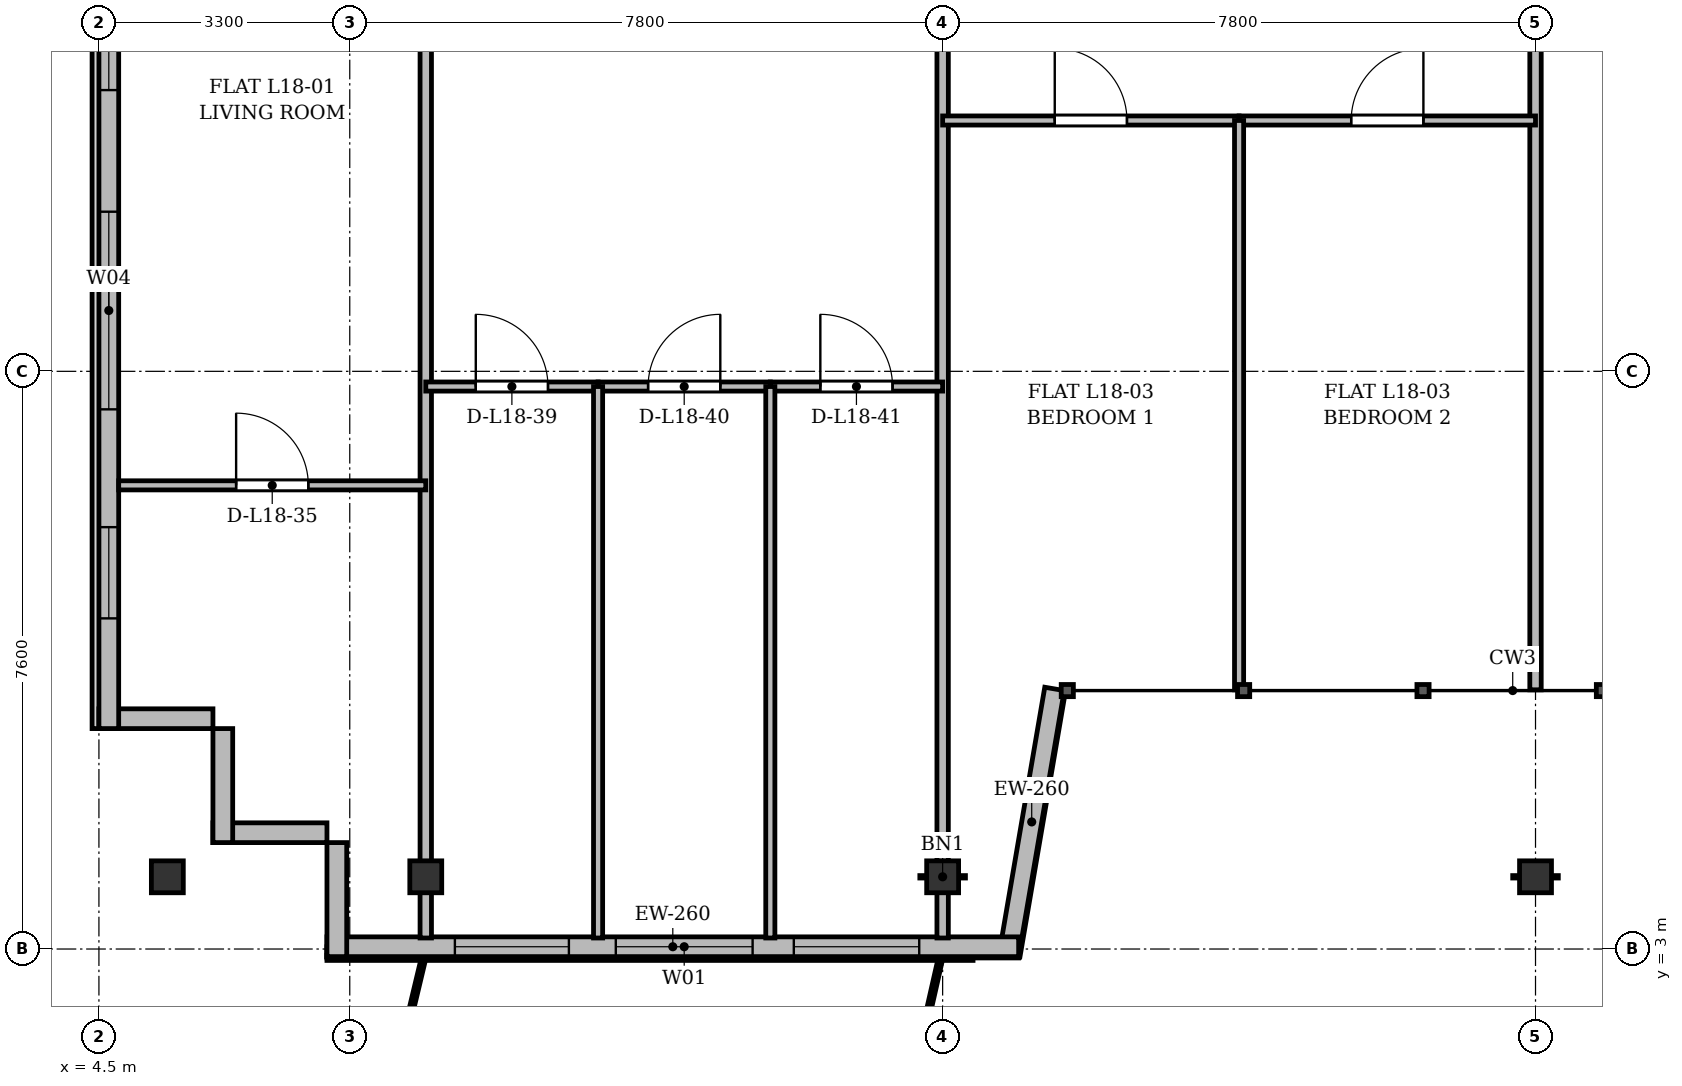
"""IFC4 building model, lengths in metres.
Left out: names, types, materials, properties, quantities, classifications, styles, units other than length and angle.
Written with IfcOpenShell. Run it as: python <this file> out.ifc"""

import sys

from ifc_helpers import new_model, si_unit, direction, frame, frame_2d, origin, origin_2d, place, context, subcontext, project, spatial, rectangle, i_section, extrude, source, transform, mapped, element, fill, save


model = new_model("IFC4")
c1 = context("Model", 3, precision=1e-05, world=origin(), true_north=direction((0.0, 1.0)))
c2 = subcontext(c1, "Body", "Model", "MODEL_VIEW")
j1 = project(units=[si_unit("LENGTHUNIT", "METRE"), si_unit("PLANEANGLEUNIT", "RADIAN")], contexts=[c1])
p1 = place(None, origin())
s1 = spatial("IfcSite", under=j1, at=p1, CompositionType="ELEMENT")
p2 = place(p1, origin())
s2 = spatial("IfcBuilding", under=s1, at=p2, CompositionType="ELEMENT")
p3 = place(p2, frame((0.0, 0.0, 70.3)))
s3 = spatial("IfcBuildingStorey", under=s2, at=p3, CompositionType="ELEMENT", Elevation=70.3)
m1 = source(origin(), c2, "Body", "SweptSolid", [
    extrude(i_section(OverallWidth=0.42, OverallDepth=0.42, WebThickness=0.026, FlangeThickness=0.04, at=origin_2d()), origin(), (0.0, 0.0, 1.0), 3.6),
])
for number, where, z_axis, x_axis in (
    (1, (5.4, 3.95, 0.0), (0.0, 0.0, 1.0), (1.0, 0.0, 0.0)),
    (2, (8.8, 3.95, 0.0), (0.0, 0.0, 1.0), (1.0, 0.0, 0.0)),
    (3, (15.6, 3.95, 0.0), (0.0, 0.0, 1.0), (1.0, 0.0, 0.0)),
    (4, (23.4, 3.95, 0.0), (0.0, 0.0, 1.0), (1.0, 0.0, 0.0)),
):
    element("IfcColumn", number, at=place(p3, frame(where, z_axis=z_axis, x_axis=x_axis)), inside=s3, PredefinedType="COLUMN", context=c2, shape_type="MappedRepresentation", body=[
        mapped(m1, transform((0.0, 0.0, 0.0), x_axis=(1.0, 0.0, 0.0), y_axis=(0.0, 1.0, 0.0), z_axis=(0.0, 0.0, 1.0), scale=1.0)),
    ])
for number, where, z_axis, x_axis in (
    (5, (7.5, 4.53, 0.0), (0.0, 0.0, 1.0), (-1.0, 0.0, 0.0)),
    (6, (6.13, 4.4, 0.0), (0.0, 0.0, 1.0), (0.0, 1.0, 0.0)),
):
    element("IfcWall", number, at=place(p3, frame(where, z_axis=z_axis, x_axis=x_axis)), inside=s3, PredefinedType="SOLIDWALL", context=c2, shape_type="SweptSolid", body=[
        extrude(rectangle(XDim=1.5, YDim=0.26, at=frame_2d((0.75, 0.0))), origin(), (0.0, 0.0, 1.0), 3.22),
    ])
p4 = place(p3, frame((6.0, 6.03, 0.0), z_axis=(0.0, 0.0, 1.0), x_axis=(-1.0, 0.0, 0.0)))
e7 = element("IfcWall", 7, at=p4, inside=s3, PredefinedType="SOLIDWALL", context=c2, shape_type="SweptSolid", body=[
    extrude(rectangle(XDim=1.5, YDim=0.26, at=frame_2d((0.75, 0.0))), origin(), (0.0, 0.0, 1.0), 2.632),
])
p5 = place(p3, frame((4.63, 5.9, 0.0), z_axis=(0.0, 0.0, 1.0), x_axis=(0.0, 1.0, 0.0)))
e8 = element("IfcWall", 8, at=p5, inside=s3, PredefinedType="SOLIDWALL", context=c2, shape_type="SweptSolid", body=[
    extrude(rectangle(XDim=39.6, YDim=0.26, at=frame_2d((19.8, 0.0))), origin(), (0.0, 0.0, 1.0), 3.22),
])
p6 = place(p5, frame((1.45, 0.0, 0.92)))
e9 = element("IfcOpeningElement", 9, at=p6, cuts=e8, PredefinedType="OPENING", context=c2, shape_type="SweptSolid", body=[
    extrude(rectangle(XDim=1.2, YDim=1.65, at=frame_2d((0.6, 0.825))), frame((0.0, 0.14, 0.0), z_axis=(0.0, -1.0, 0.0), x_axis=(1.0, 0.0, 0.0)), (0.0, 0.0, 1.0), 0.28),
])
p7 = place(p5, frame((4.2, 0.0, 0.92)))
e10 = element("IfcOpeningElement", 10, at=p7, cuts=e8, PredefinedType="OPENING", context=c2, shape_type="SweptSolid", body=[
    extrude(rectangle(XDim=2.6, YDim=1.9, at=frame_2d((1.3, 0.95))), frame((0.0, 0.14, 0.0), z_axis=(0.0, -1.0, 0.0), x_axis=(1.0, 0.0, 0.0)), (0.0, 0.0, 1.0), 0.28),
])
p8 = place(p5, frame((8.4, 0.0, 0.92)))
e11 = element("IfcOpeningElement", 11, at=p8, cuts=e8, PredefinedType="OPENING", context=c2, shape_type="SweptSolid", body=[
    extrude(rectangle(XDim=2.6, YDim=1.9, at=frame_2d((1.3, 0.95))), frame((0.0, 0.14, 0.0), z_axis=(0.0, -1.0, 0.0), x_axis=(1.0, 0.0, 0.0)), (0.0, 0.0, 1.0), 0.28),
])
p9 = place(p5, frame((33.9, 0.0, 0.92)))
e12 = element("IfcOpeningElement", 12, at=p9, cuts=e8, PredefinedType="OPENING", context=c2, shape_type="SweptSolid", body=[
    extrude(rectangle(XDim=1.2, YDim=1.65, at=frame_2d((0.6, 0.825))), frame((0.0, 0.14, 0.0), z_axis=(0.0, -1.0, 0.0), x_axis=(1.0, 0.0, 0.0)), (0.0, 0.0, 1.0), 0.28),
])
p10 = place(p5, frame((37.25, 0.0, 0.92)))
e13 = element("IfcOpeningElement", 13, at=p10, cuts=e8, PredefinedType="OPENING", context=c2, shape_type="SweptSolid", body=[
    extrude(rectangle(XDim=1.2, YDim=1.65, at=frame_2d((0.6, 0.825))), frame((0.0, 0.14, 0.0), z_axis=(0.0, -1.0, 0.0), x_axis=(1.0, 0.0, 0.0)), (0.0, 0.0, 1.0), 0.28),
])
p11 = place(p3, frame((17.072, 6.422, 0.0), z_axis=(0.0, 0.0, 1.0), x_axis=(-0.168990530437, -0.98561767467, 0.0)))
e14 = element("IfcWall", 14, at=p11, inside=s3, PredefinedType="SOLIDWALL", context=c2, shape_type="SweptSolid", body=[
    extrude(rectangle(XDim=3.551, YDim=0.26, at=frame_2d((1.775, 0.0))), origin(), (0.0, 0.0, 1.0), 2.57),
])
p12 = place(p3, frame((16.6, 3.03, 0.0), z_axis=(0.0, 0.0, 1.0), x_axis=(-1.0, 0.0, 0.0)))
e15 = element("IfcWall", 15, at=p12, inside=s3, PredefinedType="SOLIDWALL", context=c2, shape_type="SweptSolid", body=[
    extrude(rectangle(XDim=9.1, YDim=0.26, at=frame_2d((4.55, 0.0))), origin(), (0.0, 0.0, 1.0), 3.22),
])
p13 = place(p12, frame((1.308, 0.0, 0.9)))
e16 = element("IfcOpeningElement", 16, at=p13, cuts=e15, PredefinedType="OPENING", context=c2, shape_type="SweptSolid", body=[
    extrude(rectangle(XDim=1.65, YDim=1.85, at=frame_2d((0.825, 0.925))), frame((0.0, 0.14, 0.0), z_axis=(0.0, -1.0, 0.0), x_axis=(1.0, 0.0, 0.0)), (0.0, 0.0, 1.0), 0.28),
])
p14 = place(p12, frame((3.5, 0.0, 0.9)))
e17 = element("IfcOpeningElement", 17, at=p14, cuts=e15, PredefinedType="OPENING", context=c2, shape_type="SweptSolid", body=[
    extrude(rectangle(XDim=1.8, YDim=1.8, at=frame_2d((0.9, 0.9))), frame((0.0, 0.14, 0.0), z_axis=(0.0, -1.0, 0.0), x_axis=(1.0, 0.0, 0.0)), (0.0, 0.0, 1.0), 0.28),
])
p15 = place(p12, frame((5.917, 0.0, 0.9)))
e18 = element("IfcOpeningElement", 18, at=p15, cuts=e15, PredefinedType="OPENING", context=c2, shape_type="SweptSolid", body=[
    extrude(rectangle(XDim=1.5, YDim=1.75, at=frame_2d((0.75, 0.875))), frame((0.0, 0.14, 0.0), z_axis=(0.0, -1.0, 0.0), x_axis=(1.0, 0.0, 0.0)), (0.0, 0.0, 1.0), 0.28),
])
p16 = place(p3, frame((7.63, 2.9, 0.0), z_axis=(0.0, 0.0, 1.0), x_axis=(0.0, 1.0, 0.0)))
e19 = element("IfcWall", 19, at=p16, inside=s3, PredefinedType="SOLIDWALL", context=c2, shape_type="SweptSolid", body=[
    extrude(rectangle(XDim=1.5, YDim=0.26, at=frame_2d((0.75, 0.0))), origin(), (0.0, 0.0, 1.0), 2.57),
])
for number, where, z_axis, x_axis in (
    (20, (8.8, 3.145, 0.0), (0.0, 0.0, 1.0), (0.0, 1.0, 0.0)),
    (21, (15.6, 3.145, 0.0), (0.0, 0.0, 1.0), (0.0, 1.0, 0.0)),
):
    element("IfcWall", number, at=place(p3, frame(where, z_axis=z_axis, x_axis=x_axis)), inside=s3, PredefinedType="PARTITIONING", context=c2, shape_type="SweptSolid", body=[
        extrude(rectangle(XDim=24.455, YDim=0.15, at=frame_2d((12.228, 0.0))), origin(), (0.0, 0.0, 1.0), 2.632),
    ])
p17 = place(p3, frame((23.4, 6.41, 0.0), z_axis=(0.0, 0.0, 1.0), x_axis=(0.0, 1.0, 0.0)))
e22 = element("IfcWall", 22, at=p17, inside=s3, PredefinedType="PARTITIONING", context=c2, shape_type="SweptSolid", body=[
    extrude(rectangle(XDim=21.19, YDim=0.15, at=frame_2d((10.595, 0.0))), origin(), (0.0, 0.0, 1.0), 2.632),
])
p18 = place(p3, frame((4.76, 9.1, 0.0), z_axis=(0.0, 0.0, 1.0), x_axis=(1.0, 0.0, 0.0)))
e23 = element("IfcWall", 23, at=p18, inside=s3, PredefinedType="PARTITIONING", context=c2, shape_type="SweptSolid", body=[
    extrude(rectangle(XDim=4.04, YDim=0.12, at=frame_2d((2.02, 0.0))), origin(), (0.0, 0.0, 1.0), 2.632),
])
p19 = place(p18, frame((1.545, 0.0, 0.0)))
e24 = element("IfcOpeningElement", 24, at=p19, cuts=e23, PredefinedType="OPENING", context=c2, shape_type="SweptSolid", body=[
    extrude(rectangle(XDim=0.95, YDim=2.15, at=frame_2d((0.475, 1.075))), frame((0.0, 0.07, 0.0), z_axis=(0.0, -1.0, 0.0), x_axis=(1.0, 0.0, 0.0)), (0.0, 0.0, 1.0), 0.14),
])
p20 = place(p3, frame((8.8, 10.4, 0.0), z_axis=(0.0, 0.0, 1.0), x_axis=(1.0, 0.0, 0.0)))
e25 = element("IfcWall", 25, at=p20, inside=s3, PredefinedType="PARTITIONING", context=c2, shape_type="SweptSolid", body=[
    extrude(rectangle(XDim=2.267, YDim=0.12, at=frame_2d((1.133, 0.0))), origin(), (0.0, 0.0, 1.0), 2.632),
])
p21 = place(p20, frame((0.658, 0.0, 0.0)))
e26 = element("IfcOpeningElement", 26, at=p21, cuts=e25, PredefinedType="OPENING", context=c2, shape_type="SweptSolid", body=[
    extrude(rectangle(XDim=0.95, YDim=2.15, at=frame_2d((0.475, 1.075))), frame((0.0, 0.07, 0.0), z_axis=(0.0, -1.0, 0.0), x_axis=(1.0, 0.0, 0.0)), (0.0, 0.0, 1.0), 0.14),
])
p22 = place(p3, frame((11.067, 10.4, 0.0), z_axis=(0.0, 0.0, 1.0), x_axis=(1.0, 0.0, 0.0)))
e27 = element("IfcWall", 27, at=p22, inside=s3, PredefinedType="PARTITIONING", context=c2, shape_type="SweptSolid", body=[
    extrude(rectangle(XDim=2.266, YDim=0.12, at=frame_2d((1.133, 0.0))), origin(), (0.0, 0.0, 1.0), 3.22),
])
p23 = place(p22, frame((0.658, 0.0, 0.0)))
e28 = element("IfcOpeningElement", 28, at=p23, cuts=e27, PredefinedType="OPENING", context=c2, shape_type="SweptSolid", body=[
    extrude(rectangle(XDim=0.95, YDim=2.15, at=frame_2d((0.475, 1.075))), frame((0.0, 0.07, 0.0), z_axis=(0.0, -1.0, 0.0), x_axis=(1.0, 0.0, 0.0)), (0.0, 0.0, 1.0), 0.14),
])
p24 = place(p3, frame((11.067, 3.145, 0.0), z_axis=(0.0, 0.0, 1.0), x_axis=(0.0, 1.0, 0.0)))
e29 = element("IfcWall", 29, at=p24, inside=s3, PredefinedType="PARTITIONING", context=c2, shape_type="SweptSolid", body=[
    extrude(rectangle(XDim=7.255, YDim=0.12, at=frame_2d((3.627, 0.0))), origin(), (0.0, 0.0, 1.0), 2.57),
])
p25 = place(p3, frame((13.333, 10.4, 0.0), z_axis=(0.0, 0.0, 1.0), x_axis=(1.0, 0.0, 0.0)))
e30 = element("IfcWall", 30, at=p25, inside=s3, PredefinedType="PARTITIONING", context=c2, shape_type="SweptSolid", body=[
    extrude(rectangle(XDim=2.267, YDim=0.12, at=frame_2d((1.134, 0.0))), origin(), (0.0, 0.0, 1.0), 2.632),
])
p26 = place(p25, frame((0.658, 0.0, 0.0)))
e31 = element("IfcOpeningElement", 31, at=p26, cuts=e30, PredefinedType="OPENING", context=c2, shape_type="SweptSolid", body=[
    extrude(rectangle(XDim=0.95, YDim=2.15, at=frame_2d((0.475, 1.075))), frame((0.0, 0.07, 0.0), z_axis=(0.0, -1.0, 0.0), x_axis=(1.0, 0.0, 0.0)), (0.0, 0.0, 1.0), 0.14),
])
p27 = place(p3, frame((13.333, 3.145, 0.0), z_axis=(0.0, 0.0, 1.0), x_axis=(0.0, 1.0, 0.0)))
e32 = element("IfcWall", 32, at=p27, inside=s3, PredefinedType="PARTITIONING", context=c2, shape_type="SweptSolid", body=[
    extrude(rectangle(XDim=7.255, YDim=0.12, at=frame_2d((3.627, 0.0))), origin(), (0.0, 0.0, 1.0), 2.57),
])
p28 = place(p3, frame((15.6, 13.9, 0.0), z_axis=(0.0, 0.0, 1.0), x_axis=(1.0, 0.0, 0.0)))
e33 = element("IfcWall", 33, at=p28, inside=s3, PredefinedType="PARTITIONING", context=c2, shape_type="SweptSolid", body=[
    extrude(rectangle(XDim=3.9, YDim=0.12, at=frame_2d((1.95, 0.0))), origin(), (0.0, 0.0, 1.0), 2.632),
])
p29 = place(p28, frame((1.475, 0.0, 0.0)))
e34 = element("IfcOpeningElement", 34, at=p29, cuts=e33, PredefinedType="OPENING", context=c2, shape_type="SweptSolid", body=[
    extrude(rectangle(XDim=0.95, YDim=2.15, at=frame_2d((0.475, 1.075))), frame((0.0, 0.07, 0.0), z_axis=(0.0, -1.0, 0.0), x_axis=(1.0, 0.0, 0.0)), (0.0, 0.0, 1.0), 0.14),
])
p30 = place(p3, frame((19.5, 13.9, 0.0), z_axis=(0.0, 0.0, 1.0), x_axis=(1.0, 0.0, 0.0)))
e35 = element("IfcWall", 35, at=p30, inside=s3, PredefinedType="PARTITIONING", context=c2, shape_type="SweptSolid", body=[
    extrude(rectangle(XDim=3.9, YDim=0.12, at=frame_2d((1.95, 0.0))), origin(), (0.0, 0.0, 1.0), 2.632),
])
p31 = place(p30, frame((1.475, 0.0, 0.0)))
e36 = element("IfcOpeningElement", 36, at=p31, cuts=e35, PredefinedType="OPENING", context=c2, shape_type="SweptSolid", body=[
    extrude(rectangle(XDim=0.95, YDim=2.15, at=frame_2d((0.475, 1.075))), frame((0.0, 0.07, 0.0), z_axis=(0.0, -1.0, 0.0), x_axis=(1.0, 0.0, 0.0)), (0.0, 0.0, 1.0), 0.14),
])
p32 = place(p3, frame((19.5, 6.41, 0.0), z_axis=(0.0, 0.0, 1.0), x_axis=(0.0, 1.0, 0.0)))
e37 = element("IfcWall", 37, at=p32, inside=s3, PredefinedType="PARTITIONING", context=c2, shape_type="SweptSolid", body=[
    extrude(rectangle(XDim=7.49, YDim=0.12, at=frame_2d((3.745, 0.0))), origin(), (0.0, 0.0, 1.0), 3.22),
])
m2 = source(origin(), c2, "Body", "SweptSolid", [
    extrude(rectangle(XDim=1.2, YDim=1.65, at=frame_2d((0.6, 0.825))), frame((0.0, 0.03, 0.0), z_axis=(0.0, -1.0, 0.0), x_axis=(1.0, 0.0, 0.0)), (0.0, 0.0, 1.0), 0.06),
])
p33 = place(p6, origin())
e38 = element("IfcWindow", 38, at=p33, inside=s3, PartitioningType="SINGLE_PANEL", PredefinedType="WINDOW", context=c2, shape_type="MappedRepresentation", body=[
    mapped(m2, transform((0.0, 0.0, 0.0), x_axis=(1.0, 0.0, 0.0), y_axis=(0.0, 1.0, 0.0), z_axis=(0.0, 0.0, 1.0), scale=1.0)),
])
fill(e9, e38)
m3 = source(origin(), c2, "Body", "SweptSolid", [
    extrude(rectangle(XDim=2.6, YDim=1.9, at=frame_2d((1.3, 0.95))), frame((0.0, 0.03, 0.0), z_axis=(0.0, -1.0, 0.0), x_axis=(1.0, 0.0, 0.0)), (0.0, 0.0, 1.0), 0.06),
])
p34 = place(p7, origin())
e39 = element("IfcWindow", 39, at=p34, inside=s3, PartitioningType="SINGLE_PANEL", PredefinedType="WINDOW", context=c2, shape_type="MappedRepresentation", body=[
    mapped(m3, transform((0.0, 0.0, 0.0), x_axis=(1.0, 0.0, 0.0), y_axis=(0.0, 1.0, 0.0), z_axis=(0.0, 0.0, 1.0), scale=1.0)),
])
fill(e10, e39)
p35 = place(p8, origin())
e40 = element("IfcWindow", 40, at=p35, inside=s3, PartitioningType="SINGLE_PANEL", PredefinedType="WINDOW", context=c2, shape_type="MappedRepresentation", body=[
    mapped(m3, transform((0.0, 0.0, 0.0), x_axis=(1.0, 0.0, 0.0), y_axis=(0.0, 1.0, 0.0), z_axis=(0.0, 0.0, 1.0), scale=1.0)),
])
fill(e11, e40)
m4 = source(origin(), c2, "Body", "SweptSolid", [
    extrude(rectangle(XDim=1.65, YDim=1.85, at=frame_2d((0.825, 0.925))), frame((0.0, 0.03, 0.0), z_axis=(0.0, -1.0, 0.0), x_axis=(1.0, 0.0, 0.0)), (0.0, 0.0, 1.0), 0.06),
])
p36 = place(p13, origin())
e41 = element("IfcWindow", 41, at=p36, inside=s3, PartitioningType="SINGLE_PANEL", PredefinedType="WINDOW", context=c2, shape_type="MappedRepresentation", body=[
    mapped(m4, transform((0.0, 0.0, 0.0), x_axis=(1.0, 0.0, 0.0), y_axis=(0.0, 1.0, 0.0), z_axis=(0.0, 0.0, 1.0), scale=1.0)),
])
fill(e16, e41)
m5 = source(origin(), c2, "Body", "SweptSolid", [
    extrude(rectangle(XDim=1.8, YDim=1.8, at=frame_2d((0.9, 0.9))), frame((0.0, 0.03, 0.0), z_axis=(0.0, -1.0, 0.0), x_axis=(1.0, 0.0, 0.0)), (0.0, 0.0, 1.0), 0.06),
])
p37 = place(p14, origin())
e42 = element("IfcWindow", 42, at=p37, inside=s3, PartitioningType="SINGLE_PANEL", PredefinedType="WINDOW", context=c2, shape_type="MappedRepresentation", body=[
    mapped(m5, transform((0.0, 0.0, 0.0), x_axis=(1.0, 0.0, 0.0), y_axis=(0.0, 1.0, 0.0), z_axis=(0.0, 0.0, 1.0), scale=1.0)),
])
fill(e17, e42)
m6 = source(origin(), c2, "Body", "SweptSolid", [
    extrude(rectangle(XDim=1.5, YDim=1.75, at=frame_2d((0.75, 0.875))), frame((0.0, 0.03, 0.0), z_axis=(0.0, -1.0, 0.0), x_axis=(1.0, 0.0, 0.0)), (0.0, 0.0, 1.0), 0.06),
])
p38 = place(p15, origin())
e43 = element("IfcWindow", 43, at=p38, inside=s3, PartitioningType="SINGLE_PANEL", PredefinedType="WINDOW", context=c2, shape_type="MappedRepresentation", body=[
    mapped(m6, transform((0.0, 0.0, 0.0), x_axis=(1.0, 0.0, 0.0), y_axis=(0.0, 1.0, 0.0), z_axis=(0.0, 0.0, 1.0), scale=1.0)),
])
fill(e18, e43)
m7 = source(origin(), c2, "Body", "SweptSolid", [
    extrude(rectangle(XDim=0.95, YDim=2.15, at=frame_2d((0.475, 1.075))), frame((0.0, 0.025, 0.0), z_axis=(0.0, -1.0, 0.0), x_axis=(1.0, 0.0, 0.0)), (0.0, 0.0, 1.0), 0.05),
])
p39 = place(p19, origin())
e44 = element("IfcDoor", 44, at=p39, inside=s3, OperationType="SINGLE_SWING_LEFT", PredefinedType="DOOR", context=c2, shape_type="MappedRepresentation", body=[
    mapped(m7, transform((0.0, 0.0, 0.0), x_axis=(1.0, 0.0, 0.0), y_axis=(0.0, 1.0, 0.0), z_axis=(0.0, 0.0, 1.0), scale=1.0)),
])
fill(e24, e44)
p40 = place(p21, origin())
e45 = element("IfcDoor", 45, at=p40, inside=s3, OperationType="SINGLE_SWING_LEFT", PredefinedType="DOOR", context=c2, shape_type="MappedRepresentation", body=[
    mapped(m7, transform((0.0, 0.0, 0.0), x_axis=(1.0, 0.0, 0.0), y_axis=(0.0, 1.0, 0.0), z_axis=(0.0, 0.0, 1.0), scale=1.0)),
])
fill(e26, e45)
p41 = place(p23, origin())
e46 = element("IfcDoor", 46, at=p41, inside=s3, OperationType="SINGLE_SWING_RIGHT", PredefinedType="DOOR", context=c2, shape_type="MappedRepresentation", body=[
    mapped(m7, transform((0.0, 0.0, 0.0), x_axis=(1.0, 0.0, 0.0), y_axis=(0.0, 1.0, 0.0), z_axis=(0.0, 0.0, 1.0), scale=1.0)),
])
fill(e28, e46)
p42 = place(p26, origin())
e47 = element("IfcDoor", 47, at=p42, inside=s3, OperationType="SINGLE_SWING_LEFT", PredefinedType="DOOR", context=c2, shape_type="MappedRepresentation", body=[
    mapped(m7, transform((0.0, 0.0, 0.0), x_axis=(1.0, 0.0, 0.0), y_axis=(0.0, 1.0, 0.0), z_axis=(0.0, 0.0, 1.0), scale=1.0)),
])
fill(e31, e47)
p43 = place(p29, origin())
e48 = element("IfcDoor", 48, at=p43, inside=s3, OperationType="SINGLE_SWING_LEFT", PredefinedType="DOOR", context=c2, shape_type="MappedRepresentation", body=[
    mapped(m7, transform((0.0, 0.0, 0.0), x_axis=(1.0, 0.0, 0.0), y_axis=(0.0, 1.0, 0.0), z_axis=(0.0, 0.0, 1.0), scale=1.0)),
])
fill(e34, e48)
p44 = place(p31, origin())
e49 = element("IfcDoor", 49, at=p44, inside=s3, OperationType="SINGLE_SWING_RIGHT", PredefinedType="DOOR", context=c2, shape_type="MappedRepresentation", body=[
    mapped(m7, transform((0.0, 0.0, 0.0), x_axis=(1.0, 0.0, 0.0), y_axis=(0.0, 1.0, 0.0), z_axis=(0.0, 0.0, 1.0), scale=1.0)),
])
fill(e36, e49)
save(model, sys.argv[1])
